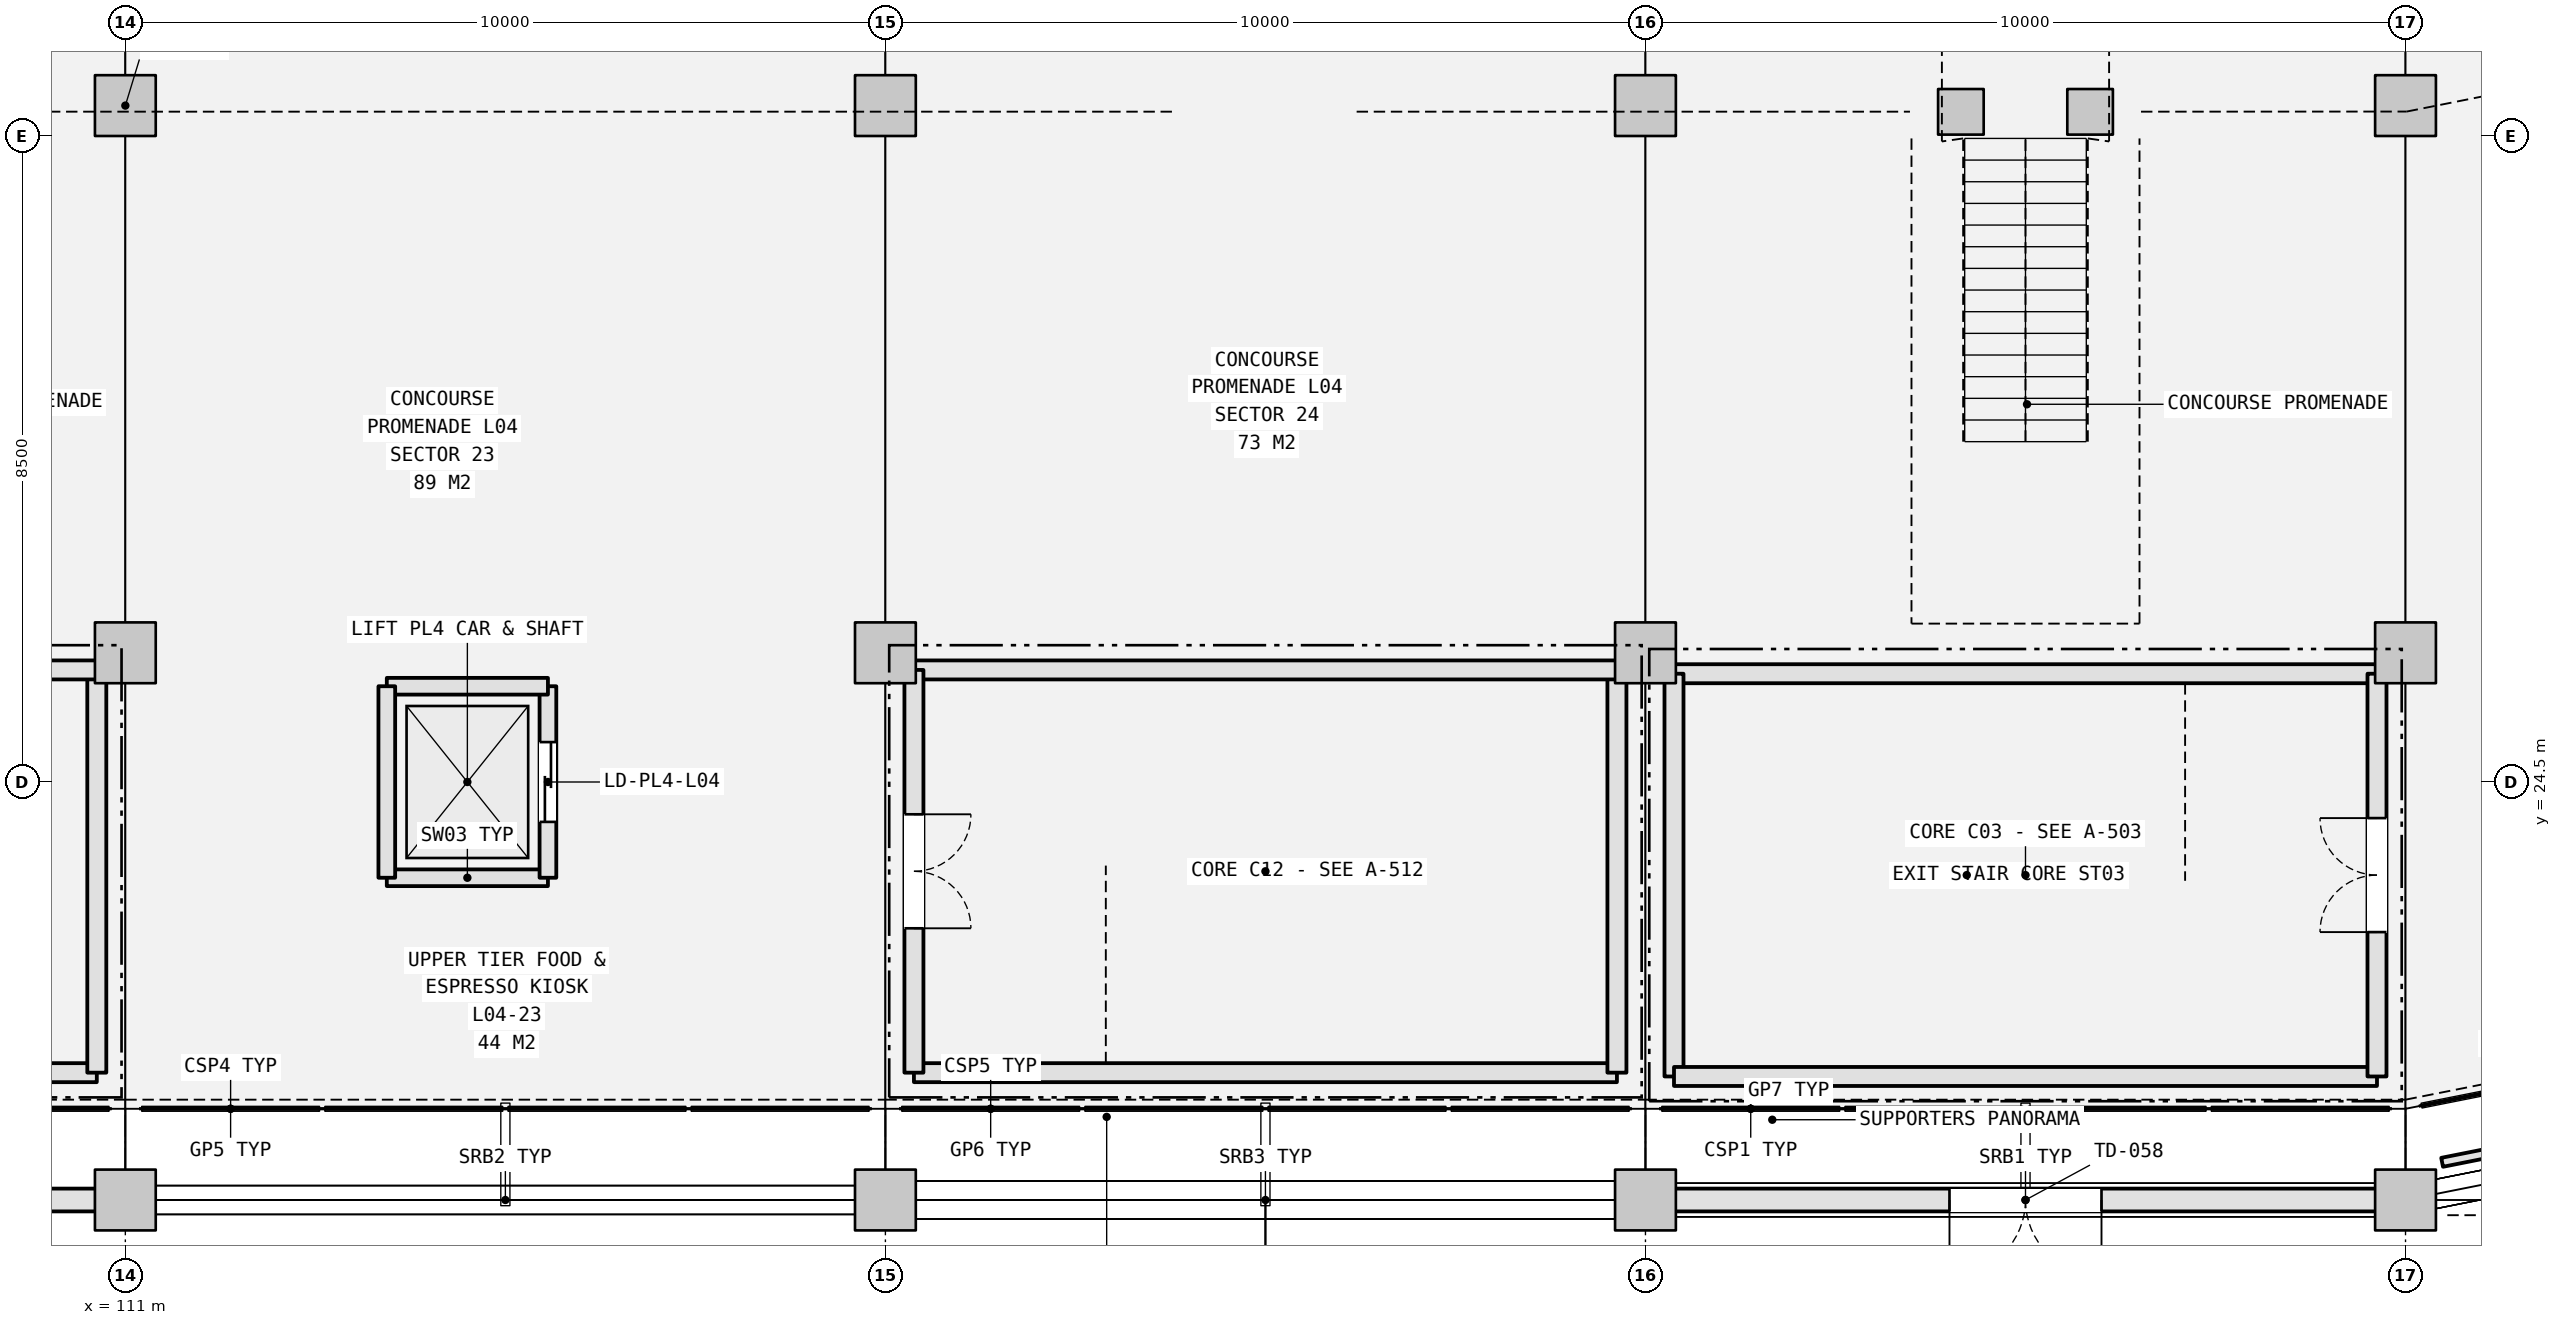
"""IFC4 building model, lengths in metres.
Left out: names, types, materials, properties, quantities, classifications, styles, units other than length and angle.
Written with IfcOpenShell. Run it as: python <this file> out.ifc"""

import sys

from ifc_helpers import new_model, si_unit, direction, frame, frame_2d, origin, origin_2d, place, context, subcontext, project, spatial, rectangle, extrude, element, fill, save


model = new_model("IFC4")
c1 = context("Model", 3, precision=1e-05, world=origin(), true_north=direction((0.0, 1.0)))
c2 = subcontext(c1, "Body", "Model", "MODEL_VIEW")
j1 = project(units=[si_unit("LENGTHUNIT", "METRE"), si_unit("PLANEANGLEUNIT", "RADIAN")], contexts=[c1])
p1 = place(None, origin())
s1 = spatial("IfcSite", under=j1, at=p1, CompositionType="ELEMENT")
p2 = place(p1, origin())
s2 = spatial("IfcBuilding", under=s1, at=p2, CompositionType="ELEMENT")
p3 = place(p2, frame((0.0, 0.0, 21.6)))
s3 = spatial("IfcBuildingStorey", under=s2, at=p3, CompositionType="ELEMENT", Elevation=21.6)
for number, where, z_axis, x_axis in (
    (1, (111.0, 33.4, 0.0), (0.0, 0.0, 1.0), (1.0, 0.0, 0.0)),
    (2, (111.0, 26.2, 0.0), (0.0, 0.0, 1.0), (1.0, 0.0, 0.0)),
    (3, (111.0, 19.0, 0.0), (0.0, 0.0, 1.0), (1.0, 0.0, 0.0)),
    (4, (121.0, 33.4, 0.0), (0.0, 0.0, 1.0), (1.0, 0.0, 0.0)),
    (5, (121.0, 26.2, 0.0), (0.0, 0.0, 1.0), (1.0, 0.0, 0.0)),
    (6, (121.0, 19.0, 0.0), (0.0, 0.0, 1.0), (1.0, 0.0, 0.0)),
    (7, (131.0, 33.4, 0.0), (0.0, 0.0, 1.0), (1.0, 0.0, 0.0)),
    (8, (131.0, 26.2, 0.0), (0.0, 0.0, 1.0), (1.0, 0.0, 0.0)),
    (9, (131.0, 19.0, 0.0), (0.0, 0.0, 1.0), (1.0, 0.0, 0.0)),
    (10, (141.0, 33.4, 0.0), (0.0, 0.0, 1.0), (1.0, 0.0, 0.0)),
    (11, (141.0, 26.2, 0.0), (0.0, 0.0, 1.0), (1.0, 0.0, 0.0)),
    (12, (141.0, 19.0, 0.0), (0.0, 0.0, 1.0), (1.0, 0.0, 0.0)),
):
    element("IfcColumn", number, at=place(p3, frame(where, z_axis=z_axis, x_axis=x_axis)), inside=s3, PredefinedType="COLUMN", context=c2, shape_type="SweptSolid", body=[
        extrude(rectangle(XDim=0.8, YDim=0.8, at=origin_2d()), origin(), (0.0, 0.0, 1.0), 5.4),
    ])
p4 = place(p3, frame((101.388, 19.0, 0.0), z_axis=(0.0, 0.0, 1.0), x_axis=(1.0, 0.0, 0.0)))
e13 = element("IfcWall", 13, at=p4, inside=s3, PredefinedType="SOLIDWALL", context=c2, shape_type="SweptSolid", body=[
    extrude(rectangle(XDim=9.224, YDim=0.3, at=frame_2d((4.612, 0.0))), origin(), (0.0, 0.0, 1.0), 2.772),
])
p5 = place(p4, frame((3.612, 0.0, 0.0)))
e14 = element("IfcOpeningElement", 14, at=p5, cuts=e13, PredefinedType="OPENING", context=c2, shape_type="SweptSolid", body=[
    extrude(rectangle(XDim=2.0, YDim=2.25, at=frame_2d((1.0, 1.125))), frame((0.0, 0.16, 0.0), z_axis=(0.0, -1.0, 0.0), x_axis=(1.0, 0.0, 0.0)), (0.0, 0.0, 1.0), 0.32),
])
p6 = place(p3, frame((131.388, 19.0, 0.0), z_axis=(0.0, 0.0, 1.0), x_axis=(1.0, 0.0, 0.0)))
e15 = element("IfcWall", 15, at=p6, inside=s3, PredefinedType="SOLIDWALL", context=c2, shape_type="SweptSolid", body=[
    extrude(rectangle(XDim=9.224, YDim=0.3, at=frame_2d((4.612, 0.0))), origin(), (0.0, 0.0, 1.0), 2.772),
])
p7 = place(p6, frame((3.612, 0.0, 0.0)))
e16 = element("IfcOpeningElement", 16, at=p7, cuts=e15, PredefinedType="OPENING", context=c2, shape_type="SweptSolid", body=[
    extrude(rectangle(XDim=2.0, YDim=2.25, at=frame_2d((1.0, 1.125))), frame((0.0, 0.16, 0.0), z_axis=(0.0, -1.0, 0.0), x_axis=(1.0, 0.0, 0.0)), (0.0, 0.0, 1.0), 0.32),
])
p8 = place(p3, frame((140.625, 25.925, 0.0), z_axis=(0.0, 0.0, 1.0), x_axis=(-1.0, 0.0, 0.0)))
e17 = element("IfcWall", 17, at=p8, inside=s3, PredefinedType="SHEAR", context=c2, shape_type="SweptSolid", body=[
    extrude(rectangle(XDim=9.249, YDim=0.25, at=frame_2d((4.625, 0.0))), origin(), (0.0, 0.0, 1.0), 5.15),
])
p9 = place(p3, frame((131.375, 25.925, 0.0), z_axis=(0.0, 0.0, 1.0), x_axis=(0.0, -1.0, 0.0)))
e18 = element("IfcWall", 18, at=p9, inside=s3, PredefinedType="SHEAR", context=c2, shape_type="SweptSolid", body=[
    extrude(rectangle(XDim=5.299, YDim=0.25, at=frame_2d((2.649, 0.0))), origin(), (0.0, 0.0, 1.0), 5.15),
])
p10 = place(p3, frame((131.375, 20.625, 0.0), z_axis=(0.0, 0.0, 1.0), x_axis=(1.0, 0.0, 0.0)))
e19 = element("IfcWall", 19, at=p10, inside=s3, PredefinedType="SHEAR", context=c2, shape_type="SweptSolid", body=[
    extrude(rectangle(XDim=9.249, YDim=0.25, at=frame_2d((4.625, 0.0))), origin(), (0.0, 0.0, 1.0), 5.15),
])
p11 = place(p3, frame((140.625, 20.625, 0.0), z_axis=(0.0, 0.0, 1.0), x_axis=(0.0, 1.0, 0.0)))
e20 = element("IfcWall", 20, at=p11, inside=s3, PredefinedType="SHEAR", context=c2, shape_type="SweptSolid", body=[
    extrude(rectangle(XDim=5.299, YDim=0.25, at=frame_2d((2.649, 0.0))), origin(), (0.0, 0.0, 1.0), 5.15),
])
p12 = place(p11, frame((1.9, 0.0, 0.0)))
e21 = element("IfcOpeningElement", 21, at=p12, cuts=e20, PredefinedType="OPENING", context=c2, shape_type="SweptSolid", body=[
    extrude(rectangle(XDim=1.5, YDim=2.2, at=frame_2d((0.75, 1.1))), frame((0.0, 0.135, 0.0), z_axis=(0.0, -1.0, 0.0), x_axis=(1.0, 0.0, 0.0)), (0.0, 0.0, 1.0), 0.27),
])
p13 = place(p3, frame((121.375, 20.675, 0.0), z_axis=(0.0, 0.0, 1.0), x_axis=(1.0, 0.0, 0.0)))
e22 = element("IfcWall", 22, at=p13, inside=s3, PredefinedType="SHEAR", context=c2, shape_type="SweptSolid", body=[
    extrude(rectangle(XDim=9.249, YDim=0.25, at=frame_2d((4.625, 0.0))), origin(), (0.0, 0.0, 1.0), 5.15),
])
p14 = place(p3, frame((130.625, 20.675, 0.0), z_axis=(0.0, 0.0, 1.0), x_axis=(0.0, 1.0, 0.0)))
e23 = element("IfcWall", 23, at=p14, inside=s3, PredefinedType="SHEAR", context=c2, shape_type="SweptSolid", body=[
    extrude(rectangle(XDim=5.299, YDim=0.25, at=frame_2d((2.65, 0.0))), origin(), (0.0, 0.0, 1.0), 5.15),
])
p15 = place(p3, frame((130.625, 25.975, 0.0), z_axis=(0.0, 0.0, 1.0), x_axis=(-1.0, 0.0, 0.0)))
e24 = element("IfcWall", 24, at=p15, inside=s3, PredefinedType="SHEAR", context=c2, shape_type="SweptSolid", body=[
    extrude(rectangle(XDim=9.249, YDim=0.25, at=frame_2d((4.625, 0.0))), origin(), (0.0, 0.0, 1.0), 5.15),
])
p16 = place(p3, frame((121.375, 25.975, 0.0), z_axis=(0.0, 0.0, 1.0), x_axis=(0.0, -1.0, 0.0)))
e25 = element("IfcWall", 25, at=p16, inside=s3, PredefinedType="SHEAR", context=c2, shape_type="SweptSolid", body=[
    extrude(rectangle(XDim=5.299, YDim=0.25, at=frame_2d((2.65, 0.0))), origin(), (0.0, 0.0, 1.0), 5.15),
])
p17 = place(p16, frame((1.9, 0.0, 0.0)))
e26 = element("IfcOpeningElement", 26, at=p17, cuts=e25, PredefinedType="OPENING", context=c2, shape_type="SweptSolid", body=[
    extrude(rectangle(XDim=1.5, YDim=2.2, at=frame_2d((0.75, 1.1))), frame((0.0, 0.135, 0.0), z_axis=(0.0, -1.0, 0.0), x_axis=(1.0, 0.0, 0.0)), (0.0, 0.0, 1.0), 0.27),
])
p18 = place(p3, frame((101.375, 20.675, 0.0), z_axis=(0.0, 0.0, 1.0), x_axis=(1.0, 0.0, 0.0)))
e27 = element("IfcWall", 27, at=p18, inside=s3, PredefinedType="SHEAR", context=c2, shape_type="SweptSolid", body=[
    extrude(rectangle(XDim=9.249, YDim=0.25, at=frame_2d((4.625, 0.0))), origin(), (0.0, 0.0, 1.0), 5.15),
])
p19 = place(p3, frame((110.625, 20.675, 0.0), z_axis=(0.0, 0.0, 1.0), x_axis=(0.0, 1.0, 0.0)))
e28 = element("IfcWall", 28, at=p19, inside=s3, PredefinedType="SHEAR", context=c2, shape_type="SweptSolid", body=[
    extrude(rectangle(XDim=5.299, YDim=0.25, at=frame_2d((2.65, 0.0))), origin(), (0.0, 0.0, 1.0), 5.15),
])
p20 = place(p3, frame((110.625, 25.975, 0.0), z_axis=(0.0, 0.0, 1.0), x_axis=(-1.0, 0.0, 0.0)))
e29 = element("IfcWall", 29, at=p20, inside=s3, PredefinedType="SHEAR", context=c2, shape_type="SweptSolid", body=[
    extrude(rectangle(XDim=9.249, YDim=0.25, at=frame_2d((4.625, 0.0))), origin(), (0.0, 0.0, 1.0), 5.15),
])
for number, where, z_axis, x_axis in (
    (30, (136.85, 33.318, 0.0), (0.0, 0.0, 1.0), (1.0, 0.0, 0.0)),
    (31, (135.15, 33.318, 0.0), (0.0, 0.0, 1.0), (1.0, 0.0, 0.0)),
):
    element("IfcColumn", number, at=place(p3, frame(where, z_axis=z_axis, x_axis=x_axis)), inside=s3, PredefinedType="COLUMN", context=c2, shape_type="SweptSolid", body=[
        extrude(rectangle(XDim=0.6, YDim=0.6, at=origin_2d()), origin(), (0.0, 0.0, 1.0), 2.494),
    ])
p21 = place(p3, frame((114.44, 23.24, 0.0), z_axis=(0.0, 0.0, 1.0), x_axis=(1.0, 0.0, 0.0)))
e32 = element("IfcWall", 32, at=p21, inside=s3, PredefinedType="SHEAR", context=c2, shape_type="SweptSolid", body=[
    extrude(rectangle(XDim=2.12, YDim=0.22, at=frame_2d((1.06, 0.0))), origin(), (0.0, 0.0, 1.0), 5.15),
])
p22 = place(p3, frame((116.56, 23.24, 0.0), z_axis=(0.0, 0.0, 1.0), x_axis=(0.0, 1.0, 0.0)))
e33 = element("IfcWall", 33, at=p22, inside=s3, PredefinedType="SHEAR", context=c2, shape_type="SweptSolid", body=[
    extrude(rectangle(XDim=2.52, YDim=0.22, at=frame_2d((1.26, 0.0))), origin(), (0.0, 0.0, 1.0), 5.15),
])
p23 = place(p22, frame((0.735, 0.0, 0.0)))
e34 = element("IfcOpeningElement", 34, at=p23, cuts=e33, PredefinedType="OPENING", context=c2, shape_type="SweptSolid", body=[
    extrude(rectangle(XDim=1.05, YDim=2.15, at=frame_2d((0.525, 1.075))), frame((0.0, 0.12, 0.0), z_axis=(0.0, -1.0, 0.0), x_axis=(1.0, 0.0, 0.0)), (0.0, 0.0, 1.0), 0.24),
])
p24 = place(p3, frame((116.56, 25.76, 0.0), z_axis=(0.0, 0.0, 1.0), x_axis=(-1.0, 0.0, 0.0)))
e35 = element("IfcWall", 35, at=p24, inside=s3, PredefinedType="SHEAR", context=c2, shape_type="SweptSolid", body=[
    extrude(rectangle(XDim=2.12, YDim=0.22, at=frame_2d((1.06, 0.0))), origin(), (0.0, 0.0, 1.0), 5.15),
])
p25 = place(p3, frame((114.44, 25.76, 0.0), z_axis=(0.0, 0.0, 1.0), x_axis=(0.0, -1.0, 0.0)))
e36 = element("IfcWall", 36, at=p25, inside=s3, PredefinedType="SHEAR", context=c2, shape_type="SweptSolid", body=[
    extrude(rectangle(XDim=2.52, YDim=0.22, at=frame_2d((1.26, 0.0))), origin(), (0.0, 0.0, 1.0), 5.15),
])
p26 = place(p3, frame((160.305, 23.24, 0.0), z_axis=(0.0, 0.0, 1.0), x_axis=(-0.98078659802, -0.195083697793, 0.0)))
e37 = element("IfcWall", 37, at=p26, inside=s3, PredefinedType="PARTITIONING", context=c2, shape_type="SweptSolid", body=[
    extrude(rectangle(XDim=19.192, YDim=0.12, at=frame_2d((9.596, 0.0))), origin(), (0.0, 0.0, 1.0), 2.772),
])
p27 = place(p7, frame((2.0, 0.0, 0.0), z_axis=(0.0, 0.0, 1.0), x_axis=(-1.0, 0.0, 0.0)))
e38 = element("IfcDoor", 38, at=p27, inside=s3, OperationType="DOUBLE_DOOR_SINGLE_SWING", PredefinedType="DOOR", context=c2, shape_type="SweptSolid", body=[
    extrude(rectangle(XDim=2.0, YDim=2.25, at=frame_2d((1.0, 1.125))), frame((0.0, 0.025, 0.0), z_axis=(0.0, -1.0, 0.0), x_axis=(1.0, 0.0, 0.0)), (0.0, 0.0, 1.0), 0.05),
])
fill(e16, e38)
p28 = place(p12, origin())
e39 = element("IfcDoor", 39, at=p28, inside=s3, OperationType="DOUBLE_DOOR_SINGLE_SWING", PredefinedType="DOOR", context=c2, shape_type="SweptSolid", body=[
    extrude(rectangle(XDim=1.5, YDim=2.2, at=frame_2d((0.75, 1.1))), frame((0.0, 0.025, 0.0), z_axis=(0.0, -1.0, 0.0), x_axis=(1.0, 0.0, 0.0)), (0.0, 0.0, 1.0), 0.05),
])
fill(e21, e39)
p29 = place(p17, origin())
e40 = element("IfcDoor", 40, at=p29, inside=s3, OperationType="DOUBLE_DOOR_SINGLE_SWING", PredefinedType="DOOR", context=c2, shape_type="SweptSolid", body=[
    extrude(rectangle(XDim=1.5, YDim=2.2, at=frame_2d((0.75, 1.1))), frame((0.0, 0.025, 0.0), z_axis=(0.0, -1.0, 0.0), x_axis=(1.0, 0.0, 0.0)), (0.0, 0.0, 1.0), 0.05),
])
fill(e26, e40)
p30 = place(p23, origin())
e41 = element("IfcDoor", 41, at=p30, inside=s3, OperationType="DOUBLE_DOOR_SLIDING", PredefinedType="DOOR", context=c2, shape_type="SweptSolid", body=[
    extrude(rectangle(XDim=1.05, YDim=2.15, at=frame_2d((0.525, 1.075))), frame((0.0, 0.025, 0.0), z_axis=(0.0, -1.0, 0.0), x_axis=(1.0, 0.0, 0.0)), (0.0, 0.0, 1.0), 0.05),
])
fill(e34, e41)
save(model, sys.argv[1])
